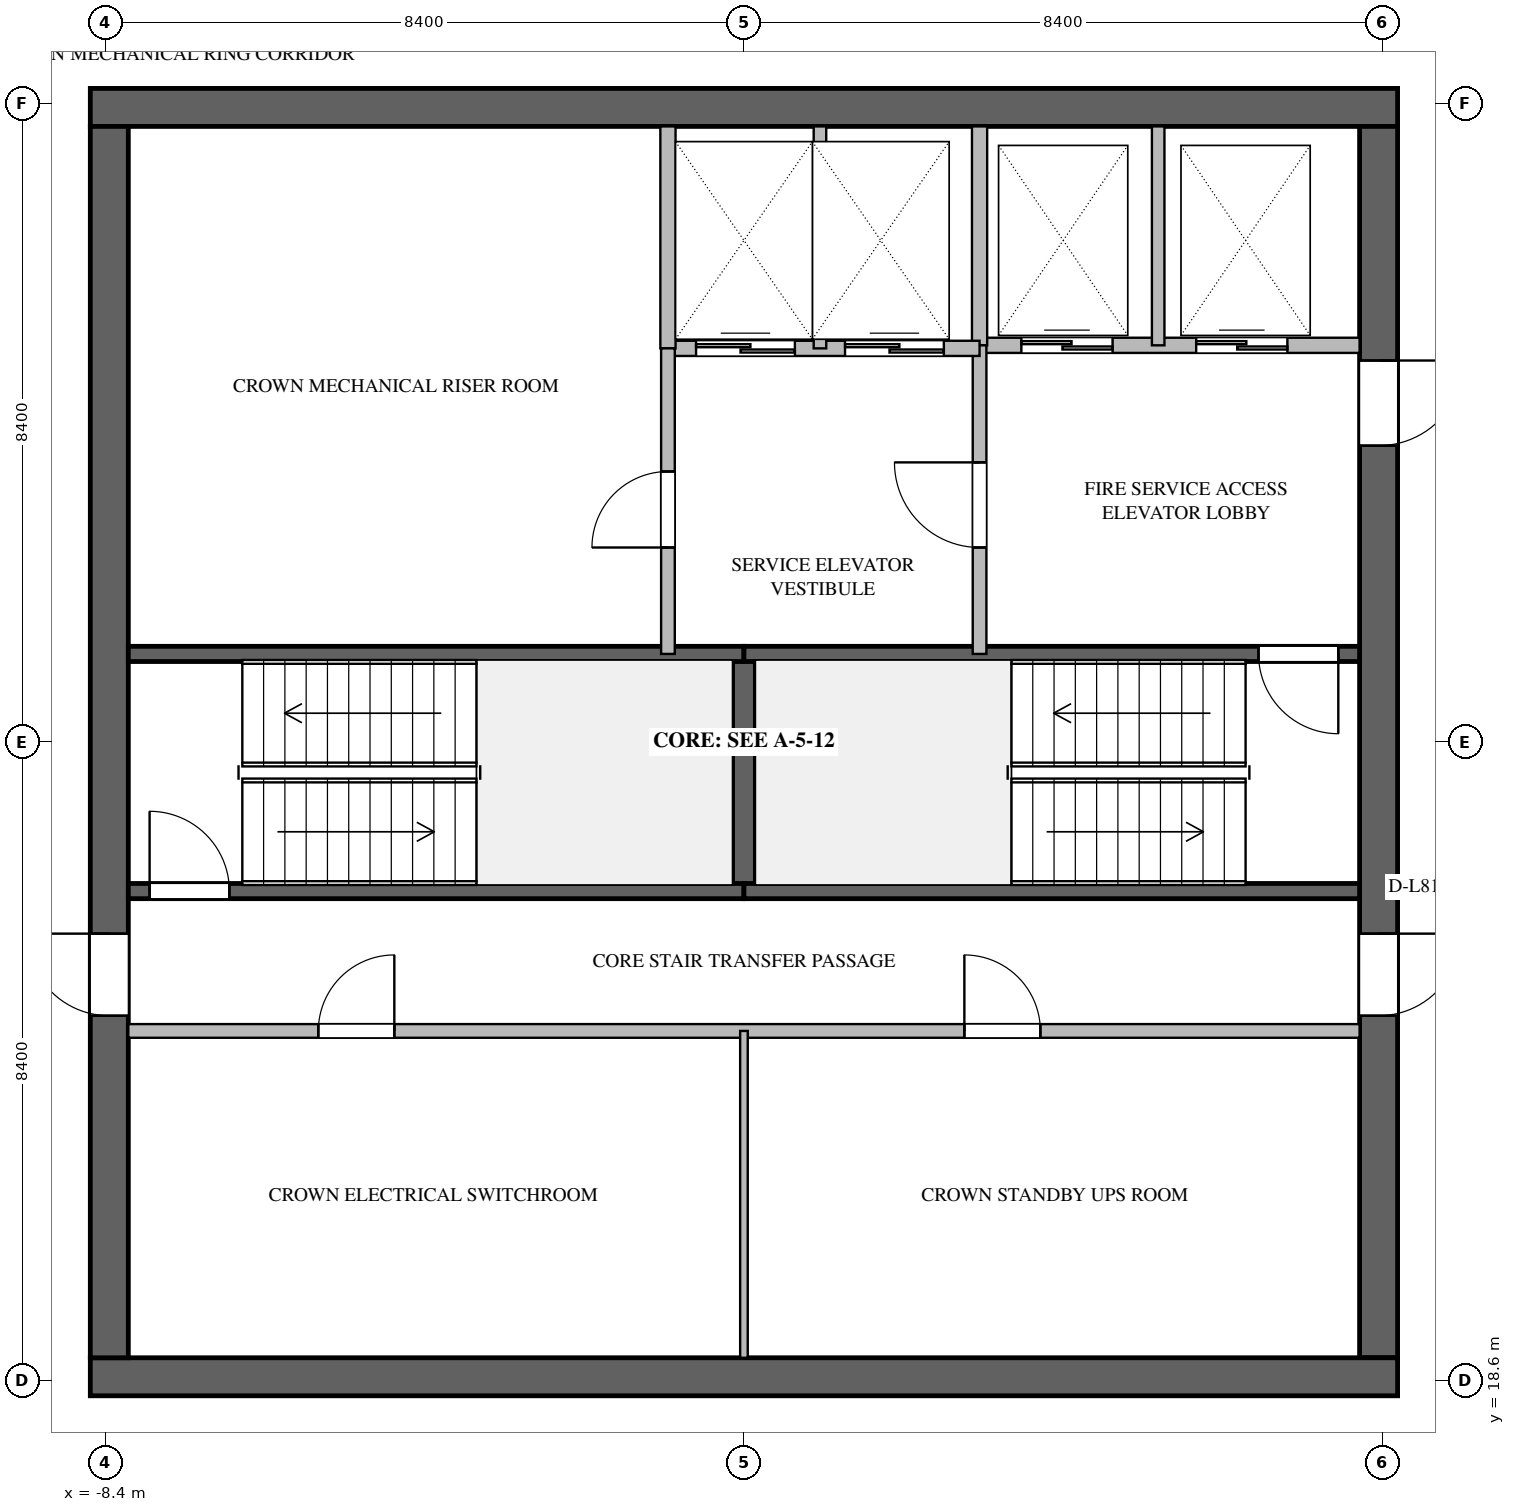
"""IFC4 building model, lengths in metres.
Left out: names, types, materials, properties, quantities, classifications, styles, units other than length and angle.
Written with IfcOpenShell. Run it as: python <this file> out.ifc"""

import sys

from ifc_helpers import new_model, si_unit, direction, frame, frame_2d, origin, place, context, subcontext, project, spatial, rectangle, extrude, element, fill, save


model = new_model("IFC4")
c1 = context("Model", 3, precision=1e-05, world=origin(), true_north=direction((0.0, 1.0)))
c2 = subcontext(c1, "Body", "Model", "MODEL_VIEW")
j1 = project(units=[si_unit("LENGTHUNIT", "METRE"), si_unit("PLANEANGLEUNIT", "RADIAN")], contexts=[c1])
p1 = place(None, origin())
s1 = spatial("IfcSite", under=j1, at=p1, CompositionType="ELEMENT")
p2 = place(p1, origin())
s2 = spatial("IfcBuilding", under=s1, at=p2, CompositionType="ELEMENT")
p3 = place(p2, frame((0.0, 0.0, 311.4)))
s3 = spatial("IfcBuildingStorey", under=s2, at=p3, CompositionType="ELEMENT", Elevation=311.4)
p4 = place(p3, frame((-8.6, 35.35, 0.0), z_axis=(0.0, 0.0, 1.0), x_axis=(1.0, 0.0, 0.0)))
e1 = element("IfcWall", 1, at=p4, inside=s3, PredefinedType="SHEAR", context=c2, shape_type="SweptSolid", body=[
    extrude(rectangle(XDim=17.2, YDim=0.5, at=frame_2d((8.6, 0.0))), origin(), (0.0, 0.0, 1.0), 4.0),
])
p5 = place(p3, frame((8.35, 35.1, 0.0), z_axis=(0.0, 0.0, 1.0), x_axis=(0.0, -1.0, 0.0)))
e2 = element("IfcWall", 2, at=p5, inside=s3, PredefinedType="SHEAR", context=c2, shape_type="SweptSolid", body=[
    extrude(rectangle(XDim=16.2, YDim=0.5, at=frame_2d((8.1, 0.0))), origin(), (0.0, 0.0, 1.0), 4.0),
])
p6 = place(p5, frame((3.08, 0.0, 0.0)))
e3 = element("IfcOpeningElement", 3, at=p6, cuts=e2, PredefinedType="OPENING", context=c2, shape_type="SweptSolid", body=[
    extrude(rectangle(XDim=1.12, YDim=2.1, at=frame_2d((0.56, 1.05))), frame((0.0, 0.26, 0.0), z_axis=(0.0, -1.0, 0.0), x_axis=(1.0, 0.0, 0.0)), (0.0, 0.0, 1.0), 0.52),
])
p7 = place(p5, frame((10.62, 0.0, 0.0)))
e4 = element("IfcOpeningElement", 4, at=p7, cuts=e2, PredefinedType="OPENING", context=c2, shape_type="SweptSolid", body=[
    extrude(rectangle(XDim=1.08, YDim=2.04, at=frame_2d((0.54, 1.02))), frame((0.0, 0.26, 0.0), z_axis=(0.0, -1.0, 0.0), x_axis=(1.0, 0.0, 0.0)), (0.0, 0.0, 1.0), 0.52),
])
p8 = place(p3, frame((8.6, 18.65, 0.0), z_axis=(0.0, 0.0, 1.0), x_axis=(-1.0, 0.0, 0.0)))
e5 = element("IfcWall", 5, at=p8, inside=s3, PredefinedType="SHEAR", context=c2, shape_type="SweptSolid", body=[
    extrude(rectangle(XDim=17.2, YDim=0.5, at=frame_2d((8.6, 0.0))), origin(), (0.0, 0.0, 1.0), 4.0),
])
p9 = place(p3, frame((-8.35, 18.9, 0.0), z_axis=(0.0, 0.0, 1.0), x_axis=(0.0, 1.0, 0.0)))
e6 = element("IfcWall", 6, at=p9, inside=s3, PredefinedType="SHEAR", context=c2, shape_type="SweptSolid", body=[
    extrude(rectangle(XDim=16.2, YDim=0.5, at=frame_2d((8.1, 0.0))), origin(), (0.0, 0.0, 1.0), 4.0),
])
p10 = place(p9, frame((4.5, 0.0, 0.0)))
e7 = element("IfcOpeningElement", 7, at=p10, cuts=e6, PredefinedType="OPENING", context=c2, shape_type="SweptSolid", body=[
    extrude(rectangle(XDim=1.08, YDim=2.04, at=frame_2d((0.54, 1.02))), frame((0.0, 0.26, 0.0), z_axis=(0.0, -1.0, 0.0), x_axis=(1.0, 0.0, 0.0)), (0.0, 0.0, 1.0), 0.52),
])
p11 = place(p3, frame((0.0, 25.04, 0.0), z_axis=(0.0, 0.0, 1.0), x_axis=(0.0, 1.0, 0.0)))
e8 = element("IfcWall", 8, at=p11, inside=s3, PredefinedType="SOLIDWALL", context=c2, shape_type="SweptSolid", body=[
    extrude(rectangle(XDim=3.12, YDim=0.3, at=frame_2d((1.56, 0.0))), origin(), (0.0, 0.0, 1.0), 3.68),
])
p12 = place(p3, frame((-8.1, 25.04, 0.0), z_axis=(0.0, 0.0, 1.0), x_axis=(1.0, 0.0, 0.0)))
e9 = element("IfcWall", 9, at=p12, inside=s3, PredefinedType="SOLIDWALL", context=c2, shape_type="SweptSolid", body=[
    extrude(rectangle(XDim=8.1, YDim=0.2, at=frame_2d((4.05, 0.0))), origin(), (0.0, 0.0, 1.0), 3.68),
])
p13 = place(p12, frame((0.28, 0.0, 0.0)))
e10 = element("IfcOpeningElement", 10, at=p13, cuts=e9, PredefinedType="OPENING", context=c2, shape_type="SweptSolid", body=[
    extrude(rectangle(XDim=1.05, YDim=2.1, at=frame_2d((0.525, 1.05))), frame((0.0, 0.11, 0.0), z_axis=(0.0, -1.0, 0.0), x_axis=(1.0, 0.0, 0.0)), (0.0, 0.0, 1.0), 0.22),
])
for number, where, z_axis, x_axis in (
    (11, (-8.1, 28.16, 0.0), (0.0, 0.0, 1.0), (1.0, 0.0, 0.0)),
    (12, (0.0, 25.04, 0.0), (0.0, 0.0, 1.0), (1.0, 0.0, 0.0)),
):
    element("IfcWall", number, at=place(p3, frame(where, z_axis=z_axis, x_axis=x_axis)), inside=s3, PredefinedType="SOLIDWALL", context=c2, shape_type="SweptSolid", body=[
        extrude(rectangle(XDim=8.1, YDim=0.2, at=frame_2d((4.05, 0.0))), origin(), (0.0, 0.0, 1.0), 3.68),
    ])
p14 = place(p3, frame((8.1, 28.16, 0.0), z_axis=(0.0, 0.0, 1.0), x_axis=(-1.0, 0.0, 0.0)))
e13 = element("IfcWall", 13, at=p14, inside=s3, PredefinedType="SOLIDWALL", context=c2, shape_type="SweptSolid", body=[
    extrude(rectangle(XDim=8.1, YDim=0.2, at=frame_2d((4.05, 0.0))), origin(), (0.0, 0.0, 1.0), 3.68),
])
p15 = place(p14, frame((0.28, 0.0, 0.0)))
e14 = element("IfcOpeningElement", 14, at=p15, cuts=e13, PredefinedType="OPENING", context=c2, shape_type="SweptSolid", body=[
    extrude(rectangle(XDim=1.05, YDim=2.1, at=frame_2d((0.525, 1.05))), frame((0.0, 0.11, 0.0), z_axis=(0.0, -1.0, 0.0), x_axis=(1.0, 0.0, 0.0)), (0.0, 0.0, 1.0), 0.22),
])
p16 = place(p3, frame((3.1, 32.22, 0.0), z_axis=(0.0, 0.0, 1.0), x_axis=(1.0, 0.0, 0.0)))
e15 = element("IfcWall", 15, at=p16, inside=s3, PredefinedType="SOLIDWALL", context=c2, shape_type="SweptSolid", body=[
    extrude(rectangle(XDim=5.0, YDim=0.2, at=frame_2d((2.5, 0.0))), origin(), (0.0, 0.0, 1.0), 3.68),
])
p17 = place(p16, frame((0.55, 0.0, 0.0)))
e16 = element("IfcOpeningElement", 16, at=p17, cuts=e15, PredefinedType="OPENING", context=c2, shape_type="SweptSolid", body=[
    extrude(rectangle(XDim=1.2, YDim=2.2, at=frame_2d((0.6, 1.1))), frame((0.0, 0.11, 0.0), z_axis=(0.0, -1.0, 0.0), x_axis=(1.0, 0.0, 0.0)), (0.0, 0.0, 1.0), 0.22),
])
p18 = place(p16, frame((2.85, 0.0, 0.0)))
e17 = element("IfcOpeningElement", 17, at=p18, cuts=e15, PredefinedType="OPENING", context=c2, shape_type="SweptSolid", body=[
    extrude(rectangle(XDim=1.2, YDim=2.2, at=frame_2d((0.6, 1.1))), frame((0.0, 0.11, 0.0), z_axis=(0.0, -1.0, 0.0), x_axis=(1.0, 0.0, 0.0)), (0.0, 0.0, 1.0), 0.22),
])
p19 = place(p3, frame((3.1, 32.22, 0.0), z_axis=(0.0, 0.0, 1.0), x_axis=(0.0, 1.0, 0.0)))
e18 = element("IfcWall", 18, at=p19, inside=s3, PredefinedType="SOLIDWALL", context=c2, shape_type="SweptSolid", body=[
    extrude(rectangle(XDim=2.88, YDim=0.2, at=frame_2d((1.44, 0.0))), origin(), (0.0, 0.0, 1.0), 3.68),
])
p20 = place(p3, frame((5.45, 32.22, 0.0), z_axis=(0.0, 0.0, 1.0), x_axis=(0.0, 1.0, 0.0)))
e19 = element("IfcWall", 19, at=p20, inside=s3, PredefinedType="PARTITIONING", context=c2, shape_type="SweptSolid", body=[
    extrude(rectangle(XDim=2.88, YDim=0.165, at=frame_2d((1.44, 0.0))), origin(), (0.0, 0.0, 1.0), 3.68),
])
p21 = place(p3, frame((3.1, 28.16, 0.0), z_axis=(0.0, 0.0, 1.0), x_axis=(0.0, 1.0, 0.0)))
e20 = element("IfcWall", 20, at=p21, inside=s3, PredefinedType="SOLIDWALL", context=c2, shape_type="SweptSolid", body=[
    extrude(rectangle(XDim=4.06, YDim=0.18, at=frame_2d((2.03, 0.0))), origin(), (0.0, 0.0, 1.0), 3.68),
])
p22 = place(p21, frame((1.4, 0.0, 0.0)))
e21 = element("IfcOpeningElement", 21, at=p22, cuts=e20, PredefinedType="OPENING", context=c2, shape_type="SweptSolid", body=[
    extrude(rectangle(XDim=1.12, YDim=2.1, at=frame_2d((0.56, 1.05))), frame((0.0, 0.1, 0.0), z_axis=(0.0, -1.0, 0.0), x_axis=(1.0, 0.0, 0.0)), (0.0, 0.0, 1.0), 0.2),
])
p23 = place(p3, frame((-1.0, 32.18, 0.0), z_axis=(0.0, 0.0, 1.0), x_axis=(1.0, 0.0, 0.0)))
e22 = element("IfcWall", 22, at=p23, inside=s3, PredefinedType="SOLIDWALL", context=c2, shape_type="SweptSolid", body=[
    extrude(rectangle(XDim=4.1, YDim=0.2, at=frame_2d((2.05, 0.0))), origin(), (0.0, 0.0, 1.0), 3.68),
])
p24 = place(p23, frame((0.37, 0.0, 0.0)))
e23 = element("IfcOpeningElement", 23, at=p24, cuts=e22, PredefinedType="OPENING", context=c2, shape_type="SweptSolid", body=[
    extrude(rectangle(XDim=1.3, YDim=2.2, at=frame_2d((0.65, 1.1))), frame((0.0, 0.11, 0.0), z_axis=(0.0, -1.0, 0.0), x_axis=(1.0, 0.0, 0.0)), (0.0, 0.0, 1.0), 0.22),
])
p25 = place(p23, frame((2.33, 0.0, 0.0)))
e24 = element("IfcOpeningElement", 24, at=p25, cuts=e22, PredefinedType="OPENING", context=c2, shape_type="SweptSolid", body=[
    extrude(rectangle(XDim=1.3, YDim=2.2, at=frame_2d((0.65, 1.1))), frame((0.0, 0.11, 0.0), z_axis=(0.0, -1.0, 0.0), x_axis=(1.0, 0.0, 0.0)), (0.0, 0.0, 1.0), 0.22),
])
p26 = place(p3, frame((-1.0, 32.18, 0.0), z_axis=(0.0, 0.0, 1.0), x_axis=(0.0, 1.0, 0.0)))
e25 = element("IfcWall", 25, at=p26, inside=s3, PredefinedType="SOLIDWALL", context=c2, shape_type="SweptSolid", body=[
    extrude(rectangle(XDim=2.92, YDim=0.2, at=frame_2d((1.46, 0.0))), origin(), (0.0, 0.0, 1.0), 3.68),
])
p27 = place(p3, frame((1.0, 32.18, 0.0), z_axis=(0.0, 0.0, 1.0), x_axis=(0.0, 1.0, 0.0)))
e26 = element("IfcWall", 26, at=p27, inside=s3, PredefinedType="PARTITIONING", context=c2, shape_type="SweptSolid", body=[
    extrude(rectangle(XDim=2.92, YDim=0.165, at=frame_2d((1.46, 0.0))), origin(), (0.0, 0.0, 1.0), 3.68),
])
p28 = place(p3, frame((-1.0, 28.16, 0.0), z_axis=(0.0, 0.0, 1.0), x_axis=(0.0, 1.0, 0.0)))
e27 = element("IfcWall", 27, at=p28, inside=s3, PredefinedType="SOLIDWALL", context=c2, shape_type="SweptSolid", body=[
    extrude(rectangle(XDim=4.02, YDim=0.18, at=frame_2d((2.01, 0.0))), origin(), (0.0, 0.0, 1.0), 3.68),
])
p29 = place(p28, frame((1.4, 0.0, 0.0)))
e28 = element("IfcOpeningElement", 28, at=p29, cuts=e27, PredefinedType="OPENING", context=c2, shape_type="SweptSolid", body=[
    extrude(rectangle(XDim=1.0, YDim=2.1, at=frame_2d((0.5, 1.05))), frame((0.0, 0.1, 0.0), z_axis=(0.0, -1.0, 0.0), x_axis=(1.0, 0.0, 0.0)), (0.0, 0.0, 1.0), 0.2),
])
p30 = place(p3, frame((-8.1, 23.2, 0.0), z_axis=(0.0, 0.0, 1.0), x_axis=(1.0, 0.0, 0.0)))
e29 = element("IfcWall", 29, at=p30, inside=s3, PredefinedType="SOLIDWALL", context=c2, shape_type="SweptSolid", body=[
    extrude(rectangle(XDim=16.2, YDim=0.18, at=frame_2d((8.1, 0.0))), origin(), (0.0, 0.0, 1.0), 3.68),
])
p31 = place(p30, frame((2.5, 0.0, 0.0)))
e30 = element("IfcOpeningElement", 30, at=p31, cuts=e29, PredefinedType="OPENING", context=c2, shape_type="SweptSolid", body=[
    extrude(rectangle(XDim=1.0, YDim=2.1, at=frame_2d((0.5, 1.05))), frame((0.0, 0.1, 0.0), z_axis=(0.0, -1.0, 0.0), x_axis=(1.0, 0.0, 0.0)), (0.0, 0.0, 1.0), 0.2),
])
p32 = place(p30, frame((11.0, 0.0, 0.0)))
e31 = element("IfcOpeningElement", 31, at=p32, cuts=e29, PredefinedType="OPENING", context=c2, shape_type="SweptSolid", body=[
    extrude(rectangle(XDim=1.0, YDim=2.1, at=frame_2d((0.5, 1.05))), frame((0.0, 0.1, 0.0), z_axis=(0.0, -1.0, 0.0), x_axis=(1.0, 0.0, 0.0)), (0.0, 0.0, 1.0), 0.2),
])
p33 = place(p3, frame((0.0, 18.9, 0.0), z_axis=(0.0, 0.0, 1.0), x_axis=(0.0, 1.0, 0.0)))
e32 = element("IfcWall", 32, at=p33, inside=s3, PredefinedType="PARTITIONING", context=c2, shape_type="SweptSolid", body=[
    extrude(rectangle(XDim=4.3, YDim=0.1, at=frame_2d((2.15, 0.0))), origin(), (0.0, 0.0, 1.0), 3.68),
])
p34 = place(p13, origin())
e33 = element("IfcDoor", 33, at=p34, inside=s3, OperationType="SINGLE_SWING_LEFT", PredefinedType="DOOR", context=c2, shape_type="SweptSolid", body=[
    extrude(rectangle(XDim=1.05, YDim=2.1, at=frame_2d((0.525, 1.05))), frame((0.0, 0.025, 0.0), z_axis=(0.0, -1.0, 0.0), x_axis=(1.0, 0.0, 0.0)), (0.0, 0.0, 1.0), 0.05),
])
fill(e10, e33)
p35 = place(p15, origin())
e34 = element("IfcDoor", 34, at=p35, inside=s3, OperationType="SINGLE_SWING_LEFT", PredefinedType="DOOR", context=c2, shape_type="SweptSolid", body=[
    extrude(rectangle(XDim=1.05, YDim=2.1, at=frame_2d((0.525, 1.05))), frame((0.0, 0.025, 0.0), z_axis=(0.0, -1.0, 0.0), x_axis=(1.0, 0.0, 0.0)), (0.0, 0.0, 1.0), 0.05),
])
fill(e14, e34)
p36 = place(p17, origin())
e35 = element("IfcDoor", 35, at=p36, inside=s3, OperationType="SLIDING_TO_LEFT", PredefinedType="DOOR", context=c2, shape_type="SweptSolid", body=[
    extrude(rectangle(XDim=1.2, YDim=2.2, at=frame_2d((0.6, 1.1))), frame((0.0, 0.025, 0.0), z_axis=(0.0, -1.0, 0.0), x_axis=(1.0, 0.0, 0.0)), (0.0, 0.0, 1.0), 0.05),
])
fill(e16, e35)
p37 = place(p18, origin())
e36 = element("IfcDoor", 36, at=p37, inside=s3, OperationType="SLIDING_TO_LEFT", PredefinedType="DOOR", context=c2, shape_type="SweptSolid", body=[
    extrude(rectangle(XDim=1.2, YDim=2.2, at=frame_2d((0.6, 1.1))), frame((0.0, 0.025, 0.0), z_axis=(0.0, -1.0, 0.0), x_axis=(1.0, 0.0, 0.0)), (0.0, 0.0, 1.0), 0.05),
])
fill(e17, e36)
p38 = place(p22, origin())
e37 = element("IfcDoor", 37, at=p38, inside=s3, OperationType="SINGLE_SWING_RIGHT", PredefinedType="DOOR", context=c2, shape_type="SweptSolid", body=[
    extrude(rectangle(XDim=1.12, YDim=2.1, at=frame_2d((0.56, 1.05))), frame((0.0, 0.025, 0.0), z_axis=(0.0, -1.0, 0.0), x_axis=(1.0, 0.0, 0.0)), (0.0, 0.0, 1.0), 0.05),
])
fill(e21, e37)
p39 = place(p6, origin())
e38 = element("IfcDoor", 38, at=p39, inside=s3, OperationType="SINGLE_SWING_LEFT", PredefinedType="DOOR", context=c2, shape_type="SweptSolid", body=[
    extrude(rectangle(XDim=1.12, YDim=2.1, at=frame_2d((0.56, 1.05))), frame((0.0, 0.025, 0.0), z_axis=(0.0, -1.0, 0.0), x_axis=(1.0, 0.0, 0.0)), (0.0, 0.0, 1.0), 0.05),
])
fill(e3, e38)
p40 = place(p24, origin())
e39 = element("IfcDoor", 39, at=p40, inside=s3, OperationType="SLIDING_TO_LEFT", PredefinedType="DOOR", context=c2, shape_type="SweptSolid", body=[
    extrude(rectangle(XDim=1.3, YDim=2.2, at=frame_2d((0.65, 1.1))), frame((0.0, 0.025, 0.0), z_axis=(0.0, -1.0, 0.0), x_axis=(1.0, 0.0, 0.0)), (0.0, 0.0, 1.0), 0.05),
])
fill(e23, e39)
p41 = place(p25, origin())
e40 = element("IfcDoor", 40, at=p41, inside=s3, OperationType="SLIDING_TO_LEFT", PredefinedType="DOOR", context=c2, shape_type="SweptSolid", body=[
    extrude(rectangle(XDim=1.3, YDim=2.2, at=frame_2d((0.65, 1.1))), frame((0.0, 0.025, 0.0), z_axis=(0.0, -1.0, 0.0), x_axis=(1.0, 0.0, 0.0)), (0.0, 0.0, 1.0), 0.05),
])
fill(e24, e40)
p42 = place(p29, origin())
e41 = element("IfcDoor", 41, at=p42, inside=s3, OperationType="SINGLE_SWING_LEFT", PredefinedType="DOOR", context=c2, shape_type="SweptSolid", body=[
    extrude(rectangle(XDim=1.0, YDim=2.1, at=frame_2d((0.5, 1.05))), frame((0.0, 0.025, 0.0), z_axis=(0.0, -1.0, 0.0), x_axis=(1.0, 0.0, 0.0)), (0.0, 0.0, 1.0), 0.05),
])
fill(e28, e41)
p43 = place(p10, origin())
e42 = element("IfcDoor", 42, at=p43, inside=s3, OperationType="SINGLE_SWING_RIGHT", PredefinedType="DOOR", context=c2, shape_type="SweptSolid", body=[
    extrude(rectangle(XDim=1.08, YDim=2.04, at=frame_2d((0.54, 1.02))), frame((0.0, 0.025, 0.0), z_axis=(0.0, -1.0, 0.0), x_axis=(1.0, 0.0, 0.0)), (0.0, 0.0, 1.0), 0.05),
])
fill(e7, e42)
p44 = place(p7, origin())
e43 = element("IfcDoor", 43, at=p44, inside=s3, OperationType="SINGLE_SWING_LEFT", PredefinedType="DOOR", context=c2, shape_type="SweptSolid", body=[
    extrude(rectangle(XDim=1.08, YDim=2.04, at=frame_2d((0.54, 1.02))), frame((0.0, 0.025, 0.0), z_axis=(0.0, -1.0, 0.0), x_axis=(1.0, 0.0, 0.0)), (0.0, 0.0, 1.0), 0.05),
])
fill(e4, e43)
p45 = place(p31, origin())
e44 = element("IfcDoor", 44, at=p45, inside=s3, OperationType="SINGLE_SWING_RIGHT", PredefinedType="DOOR", context=c2, shape_type="SweptSolid", body=[
    extrude(rectangle(XDim=1.0, YDim=2.1, at=frame_2d((0.5, 1.05))), frame((0.0, 0.025, 0.0), z_axis=(0.0, -1.0, 0.0), x_axis=(1.0, 0.0, 0.0)), (0.0, 0.0, 1.0), 0.05),
])
fill(e30, e44)
p46 = place(p32, origin())
e45 = element("IfcDoor", 45, at=p46, inside=s3, OperationType="SINGLE_SWING_LEFT", PredefinedType="DOOR", context=c2, shape_type="SweptSolid", body=[
    extrude(rectangle(XDim=1.0, YDim=2.1, at=frame_2d((0.5, 1.05))), frame((0.0, 0.025, 0.0), z_axis=(0.0, -1.0, 0.0), x_axis=(1.0, 0.0, 0.0)), (0.0, 0.0, 1.0), 0.05),
])
fill(e31, e45)
save(model, sys.argv[1])
